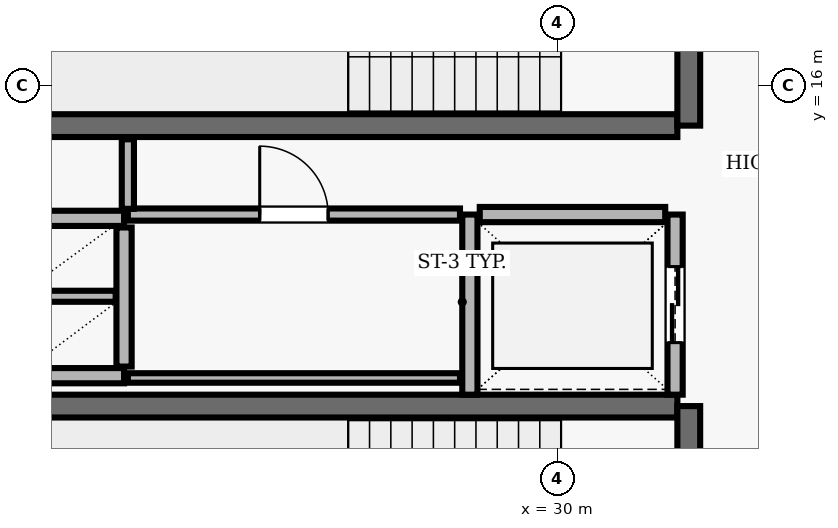
"""IFC4 building model, lengths in metres.
Left out: names, types, materials, properties, quantities, classifications, styles, units other than length and angle.
Written with IfcOpenShell. Run it as: python <this file> out.ifc"""

import sys

from ifc_helpers import new_model, si_unit, direction, frame, frame_2d, origin, place, context, subcontext, project, spatial, rectangle, extrude, element, fill, save


model = new_model("IFC4")
c1 = context("Model", 3, precision=1e-05, world=origin(), true_north=direction((0.0, 1.0)))
c2 = subcontext(c1, "Body", "Model", "MODEL_VIEW")
j1 = project(units=[si_unit("LENGTHUNIT", "METRE"), si_unit("PLANEANGLEUNIT", "RADIAN")], contexts=[c1])
p1 = place(None, origin())
s1 = spatial("IfcSite", under=j1, at=p1, CompositionType="ELEMENT")
p2 = place(p1, origin())
s2 = spatial("IfcBuilding", under=s1, at=p2, CompositionType="ELEMENT")
p3 = place(p2, frame((0.0, 0.0, 234.3)))
s3 = spatial("IfcBuildingStorey", under=s2, at=p3, CompositionType="ELEMENT", Elevation=234.3)
p4 = place(p3, frame((23.22, 15.47, 0.0), z_axis=(0.0, 0.0, 1.0), x_axis=(1.0, 0.0, 0.0)))
e1 = element("IfcWall", 1, at=p4, inside=s3, PredefinedType="SHEAR", context=c2, shape_type="SweptSolid", body=[
    extrude(rectangle(XDim=8.36, YDim=0.3, at=frame_2d((4.18, 0.0))), origin(), (0.0, 0.0, 1.0), 3.64),
])
p5 = place(p3, frame((31.73, 15.47, 0.0), z_axis=(0.0, 0.0, 1.0), x_axis=(0.0, 1.0, 0.0)))
e2 = element("IfcWall", 2, at=p5, inside=s3, PredefinedType="SHEAR", context=c2, shape_type="SweptSolid", body=[
    extrude(rectangle(XDim=3.51, YDim=0.3, at=frame_2d((1.755, 0.0))), origin(), (0.0, 0.0, 1.0), 3.64),
])
p6 = place(p5, frame((1.18, 0.0, 0.0)))
e3 = element("IfcOpeningElement", 3, at=p6, cuts=e2, PredefinedType="OPENING", context=c2, shape_type="SweptSolid", body=[
    extrude(rectangle(XDim=1.15, YDim=2.15, at=frame_2d((0.575, 1.075))), frame((0.0, 0.16, 0.0), z_axis=(0.0, -1.0, 0.0), x_axis=(1.0, 0.0, 0.0)), (0.0, 0.0, 1.0), 0.32),
])
p7 = place(p3, frame((31.58, 11.78, 0.0), z_axis=(0.0, 0.0, 1.0), x_axis=(-1.0, 0.0, 0.0)))
e4 = element("IfcWall", 4, at=p7, inside=s3, PredefinedType="SHEAR", context=c2, shape_type="SweptSolid", body=[
    extrude(rectangle(XDim=8.36, YDim=0.3, at=frame_2d((4.18, 0.0))), origin(), (0.0, 0.0, 1.0), 3.64),
])
p8 = place(p3, frame((31.73, 8.27, 0.0), z_axis=(0.0, 0.0, 1.0), x_axis=(0.0, 1.0, 0.0)))
e5 = element("IfcWall", 5, at=p8, inside=s3, PredefinedType="SHEAR", context=c2, shape_type="SweptSolid", body=[
    extrude(rectangle(XDim=3.51, YDim=0.3, at=frame_2d((1.755, 0.0))), origin(), (0.0, 0.0, 1.0), 3.64),
])
p9 = place(p8, frame((1.18, 0.0, 0.0)))
e6 = element("IfcOpeningElement", 6, at=p9, cuts=e5, PredefinedType="OPENING", context=c2, shape_type="SweptSolid", body=[
    extrude(rectangle(XDim=1.15, YDim=2.15, at=frame_2d((0.575, 1.075))), frame((0.0, 0.16, 0.0), z_axis=(0.0, -1.0, 0.0), x_axis=(1.0, 0.0, 0.0)), (0.0, 0.0, 1.0), 0.32),
])
p10 = place(p3, frame((28.85, 14.3, 0.0), z_axis=(0.0, 0.0, 1.0), x_axis=(0.0, -1.0, 0.0)))
e7 = element("IfcWall", 7, at=p10, inside=s3, PredefinedType="SOLIDWALL", context=c2, shape_type="SweptSolid", body=[
    extrude(rectangle(XDim=2.37, YDim=0.2, at=frame_2d((1.185, 0.0))), origin(), (0.0, 0.0, 1.0), 3.64),
])
p11 = place(p3, frame((31.55, 11.93, 0.0), z_axis=(0.0, 0.0, 1.0), x_axis=(0.0, 1.0, 0.0)))
e8 = element("IfcWall", 8, at=p11, inside=s3, PredefinedType="SOLIDWALL", context=c2, shape_type="SweptSolid", body=[
    extrude(rectangle(XDim=2.37, YDim=0.2, at=frame_2d((1.185, 0.0))), origin(), (0.0, 0.0, 1.0), 3.64),
])
p12 = place(p11, frame((0.685, 0.0, 0.0)))
e9 = element("IfcOpeningElement", 9, at=p12, cuts=e8, PredefinedType="OPENING", context=c2, shape_type="SweptSolid", body=[
    extrude(rectangle(XDim=1.0, YDim=2.1, at=frame_2d((0.5, 1.05))), frame((0.0, 0.11, 0.0), z_axis=(0.0, -1.0, 0.0), x_axis=(1.0, 0.0, 0.0)), (0.0, 0.0, 1.0), 0.22),
])
p13 = place(p3, frame((31.42, 14.3, 0.0), z_axis=(0.0, 0.0, 1.0), x_axis=(-1.0, 0.0, 0.0)))
e10 = element("IfcWall", 10, at=p13, inside=s3, PredefinedType="SOLIDWALL", context=c2, shape_type="SweptSolid", body=[
    extrude(rectangle(XDim=2.44, YDim=0.2, at=frame_2d((1.22, 0.0))), origin(), (0.0, 0.0, 1.0), 3.64),
])
for number, where, z_axis, x_axis in (
    (11, (22.9, 14.25, 0.0), (0.0, 0.0, 1.0), (1.0, 0.0, 0.0)),
    (12, (22.9, 12.18, 0.0), (0.0, 0.0, 1.0), (1.0, 0.0, 0.0)),
):
    element("IfcWall", number, at=place(p3, frame(where, z_axis=z_axis, x_axis=x_axis)), inside=s3, PredefinedType="SOLIDWALL", context=c2, shape_type="SweptSolid", body=[
        extrude(rectangle(XDim=1.4, YDim=0.2, at=frame_2d((0.7, 0.0))), origin(), (0.0, 0.0, 1.0), 3.64),
    ])
p14 = place(p3, frame((24.3, 12.3, 0.0), z_axis=(0.0, 0.0, 1.0), x_axis=(0.0, 1.0, 0.0)))
e13 = element("IfcWall", 13, at=p14, inside=s3, PredefinedType="SOLIDWALL", context=c2, shape_type="SweptSolid", body=[
    extrude(rectangle(XDim=1.83, YDim=0.2, at=frame_2d((0.915, 0.0))), origin(), (0.0, 0.0, 1.0), 3.64),
])
p15 = place(p3, frame((23.01, 13.225, 0.0), z_axis=(0.0, 0.0, 1.0), x_axis=(1.0, 0.0, 0.0)))
e14 = element("IfcWall", 14, at=p15, inside=s3, PredefinedType="PARTITIONING", context=c2, shape_type="SweptSolid", body=[
    extrude(rectangle(XDim=1.18, YDim=0.145, at=frame_2d((0.59, 0.0))), origin(), (0.0, 0.0, 1.0), 3.64),
])
p16 = place(p3, frame((24.35, 12.15, 0.0), z_axis=(0.0, 0.0, 1.0), x_axis=(1.0, 0.0, 0.0)))
e15 = element("IfcWall", 15, at=p16, inside=s3, PredefinedType="PARTITIONING", context=c2, shape_type="SweptSolid", body=[
    extrude(rectangle(XDim=4.37, YDim=0.125, at=frame_2d((2.185, 0.0))), origin(), (0.0, 0.0, 1.0), 3.64),
])
p17 = place(p3, frame((24.35, 14.3, 0.0), z_axis=(0.0, 0.0, 1.0), x_axis=(1.0, 0.0, 0.0)))
e16 = element("IfcWall", 16, at=p17, inside=s3, PredefinedType="PARTITIONING", context=c2, shape_type="SweptSolid", body=[
    extrude(rectangle(XDim=4.37, YDim=0.16, at=frame_2d((2.185, 0.0))), origin(), (0.0, 0.0, 1.0), 3.64),
])
p18 = place(p17, frame((1.735, 0.0, 0.0)))
e17 = element("IfcOpeningElement", 17, at=p18, cuts=e16, PredefinedType="OPENING", context=c2, shape_type="SweptSolid", body=[
    extrude(rectangle(XDim=0.9, YDim=2.1, at=frame_2d((0.45, 1.05))), frame((0.0, 0.09, 0.0), z_axis=(0.0, -1.0, 0.0), x_axis=(1.0, 0.0, 0.0)), (0.0, 0.0, 1.0), 0.18),
])
p19 = place(p3, frame((24.35, 15.29, 0.0), z_axis=(0.0, 0.0, 1.0), x_axis=(0.0, -1.0, 0.0)))
e18 = element("IfcWall", 18, at=p19, inside=s3, PredefinedType="PARTITIONING", context=c2, shape_type="SweptSolid", body=[
    extrude(rectangle(XDim=0.915, YDim=0.16, at=frame_2d((0.458, 0.0))), origin(), (0.0, 0.0, 1.0), 3.64),
])
p20 = place(p12, origin())
e19 = element("IfcDoor", 19, at=p20, inside=s3, OperationType="DOUBLE_DOOR_SLIDING", PredefinedType="DOOR", context=c2, shape_type="SweptSolid", body=[
    extrude(rectangle(XDim=1.0, YDim=2.1, at=frame_2d((0.5, 1.05))), frame((0.0, 0.025, 0.0), z_axis=(0.0, -1.0, 0.0), x_axis=(1.0, 0.0, 0.0)), (0.0, 0.0, 1.0), 0.05),
])
fill(e9, e19)
p21 = place(p18, origin())
e20 = element("IfcDoor", 20, at=p21, inside=s3, OperationType="SINGLE_SWING_LEFT", PredefinedType="DOOR", context=c2, shape_type="SweptSolid", body=[
    extrude(rectangle(XDim=0.9, YDim=2.1, at=frame_2d((0.45, 1.05))), frame((0.0, 0.025, 0.0), z_axis=(0.0, -1.0, 0.0), x_axis=(1.0, 0.0, 0.0)), (0.0, 0.0, 1.0), 0.05),
])
fill(e17, e20)
save(model, sys.argv[1])
